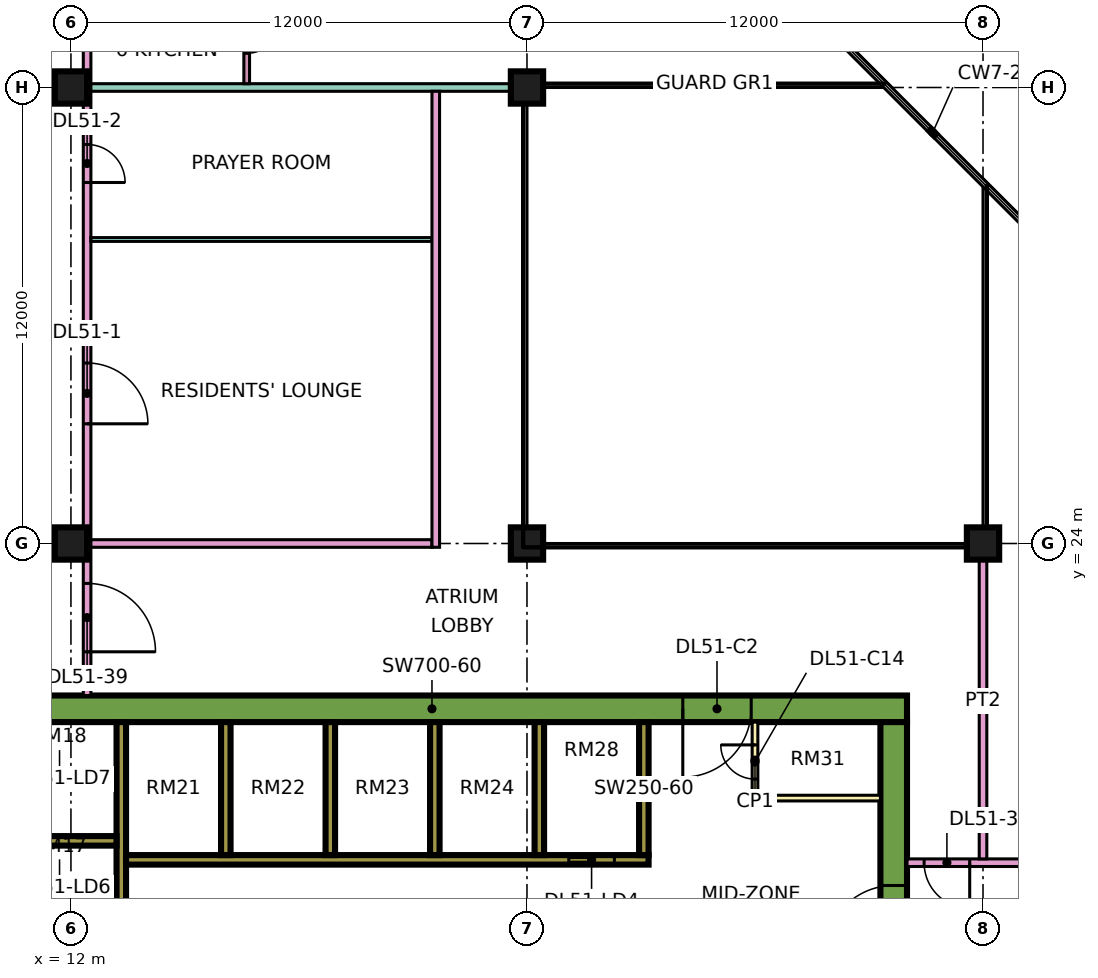
"""IFC4 building model, lengths in metres.
Left out: names, types, materials, properties, quantities, classifications, styles, units other than length and angle.
Written with IfcOpenShell. Run it as: python <this file> out.ifc"""

import sys

from ifc_helpers import new_model, si_unit, direction, frame, frame_2d, origin, origin_2d, place, context, subcontext, project, spatial, rectangle, extrude, element, fill, save


model = new_model("IFC4")
c1 = context("Model", 3, precision=1e-05, world=origin(), true_north=direction((0.0, 1.0)))
c2 = subcontext(c1, "Body", "Model", "MODEL_VIEW")
j1 = project(units=[si_unit("LENGTHUNIT", "METRE"), si_unit("PLANEANGLEUNIT", "RADIAN")], contexts=[c1])
p1 = place(None, origin())
s1 = spatial("IfcSite", under=j1, at=p1, CompositionType="ELEMENT")
p2 = place(p1, origin())
s2 = spatial("IfcBuilding", under=s1, at=p2, CompositionType="ELEMENT")
p3 = place(p2, frame((0.0, 0.0, 219.15)))
s3 = spatial("IfcBuildingStorey", under=s2, at=p3, CompositionType="ELEMENT", Elevation=219.15)
for number, where, z_axis, x_axis in (
    (1, (12.0, 24.0, 0.0), (0.0, 0.0, 1.0), (1.0, 0.0, 0.0)),
    (2, (12.0, 36.0, 0.0), (0.0, 0.0, 1.0), (1.0, 0.0, 0.0)),
    (3, (24.0, 24.0, 0.0), (0.0, 0.0, 1.0), (1.0, 0.0, 0.0)),
    (4, (24.0, 36.0, 0.0), (0.0, 0.0, 1.0), (1.0, 0.0, 0.0)),
    (5, (36.0, 24.0, 0.0), (0.0, 0.0, 1.0), (1.0, 0.0, 0.0)),
):
    element("IfcColumn", number, at=place(p3, frame(where, z_axis=z_axis, x_axis=x_axis)), inside=s3, PredefinedType="COLUMN", context=c2, shape_type="SweptSolid", body=[
        extrude(rectangle(XDim=0.85, YDim=0.85, at=origin_2d()), origin(), (0.0, 0.0, 1.0), 3.75),
    ])
p4 = place(p3, frame((9.0, 19.65, 0.0), z_axis=(0.0, 0.0, 1.0), x_axis=(1.0, 0.0, 0.0)))
e6 = element("IfcWall", 6, at=p4, inside=s3, PredefinedType="SHEAR", context=c2, shape_type="SweptSolid", body=[
    extrude(rectangle(XDim=25.0, YDim=0.7, at=frame_2d((12.5, 0.0))), origin(), (0.0, 0.0, 1.0), 3.75),
])
p5 = place(p4, frame((19.1, 0.0, 0.0)))
e7 = element("IfcOpeningElement", 7, at=p5, cuts=e6, PredefinedType="OPENING", context=c2, shape_type="SweptSolid", body=[
    extrude(rectangle(XDim=1.8, YDim=2.4, at=frame_2d((0.9, 1.2))), frame((0.0, 0.36, 0.0), z_axis=(0.0, -1.0, 0.0), x_axis=(1.0, 0.0, 0.0)), (0.0, 0.0, 1.0), 0.72),
])
p6 = place(p3, frame((33.65, 7.7, 0.0), z_axis=(0.0, 0.0, 1.0), x_axis=(0.0, 1.0, 0.0)))
e8 = element("IfcWall", 8, at=p6, inside=s3, PredefinedType="SHEAR", context=c2, shape_type="SweptSolid", body=[
    extrude(rectangle(XDim=11.6, YDim=0.7, at=frame_2d((5.8, 0.0))), origin(), (0.0, 0.0, 1.0), 3.75),
])
p7 = place(p6, frame((5.5, 0.0, 0.0)))
e9 = element("IfcOpeningElement", 9, at=p7, cuts=e8, PredefinedType="OPENING", context=c2, shape_type="SweptSolid", body=[
    extrude(rectangle(XDim=1.8, YDim=2.4, at=frame_2d((0.9, 1.2))), frame((0.0, 0.36, 0.0), z_axis=(0.0, -1.0, 0.0), x_axis=(1.0, 0.0, 0.0)), (0.0, 0.0, 1.0), 0.72),
])
p8 = place(p3, frame((13.325, 7.7, 0.0), z_axis=(0.0, 0.0, 1.0), x_axis=(0.0, 1.0, 0.0)))
e10 = element("IfcWall", 10, at=p8, inside=s3, PredefinedType="SHEAR", context=c2, shape_type="SweptSolid", body=[
    extrude(rectangle(XDim=11.6, YDim=0.25, at=frame_2d((5.8, 0.0))), origin(), (0.0, 0.0, 1.0), 3.75),
])
p9 = place(p3, frame((13.45, 15.675, 0.0), z_axis=(0.0, 0.0, 1.0), x_axis=(1.0, 0.0, 0.0)))
e11 = element("IfcWall", 11, at=p9, inside=s3, PredefinedType="SHEAR", context=c2, shape_type="SweptSolid", body=[
    extrude(rectangle(XDim=13.75, YDim=0.25, at=frame_2d((6.875, 0.0))), origin(), (0.0, 0.0, 1.0), 3.75),
])
p10 = place(p9, frame((11.65, 0.0, 0.0)))
e12 = element("IfcOpeningElement", 12, at=p10, cuts=e11, PredefinedType="OPENING", context=c2, shape_type="SweptSolid", body=[
    extrude(rectangle(XDim=1.2, YDim=2.2, at=frame_2d((0.6, 1.1))), frame((0.0, 0.135, 0.0), z_axis=(0.0, -1.0, 0.0), x_axis=(1.0, 0.0, 0.0)), (0.0, 0.0, 1.0), 0.27),
])
p11 = place(p3, frame((10.2, 16.175, 0.0), z_axis=(0.0, 0.0, 1.0), x_axis=(1.0, 0.0, 0.0)))
e13 = element("IfcWall", 13, at=p11, inside=s3, PredefinedType="SHEAR", context=c2, shape_type="SweptSolid", body=[
    extrude(rectangle(XDim=3.0, YDim=0.25, at=frame_2d((1.5, 0.0))), origin(), (0.0, 0.0, 1.0), 3.75),
])
for number, where, z_axis, x_axis in (
    (14, (16.075, 15.8, 0.0), (0.0, 0.0, 1.0), (0.0, 1.0, 0.0)),
    (15, (18.825, 15.8, 0.0), (0.0, 0.0, 1.0), (0.0, 1.0, 0.0)),
    (16, (21.575, 15.8, 0.0), (0.0, 0.0, 1.0), (0.0, 1.0, 0.0)),
    (17, (24.325, 15.8, 0.0), (0.0, 0.0, 1.0), (0.0, 1.0, 0.0)),
    (18, (27.075, 15.8, 0.0), (0.0, 0.0, 1.0), (0.0, 1.0, 0.0)),
):
    element("IfcWall", number, at=place(p3, frame(where, z_axis=z_axis, x_axis=x_axis)), inside=s3, PredefinedType="SHEAR", context=c2, shape_type="SweptSolid", body=[
        extrude(rectangle(XDim=3.5, YDim=0.25, at=frame_2d((1.75, 0.0))), origin(), (0.0, 0.0, 1.0), 3.75),
    ])
p12 = place(p3, frame((30.0, 17.3, 0.0), z_axis=(0.0, 0.0, 1.0), x_axis=(0.0, 1.0, 0.0)))
e19 = element("IfcWall", 19, at=p12, inside=s3, PredefinedType="PARTITIONING", context=c2, shape_type="SweptSolid", body=[
    extrude(rectangle(XDim=2.0, YDim=0.15, at=frame_2d((1.0, 0.0))), origin(), (0.0, 0.0, 1.0), 3.35),
])
p13 = place(p12, frame((0.5, 0.0, 0.0)))
e20 = element("IfcOpeningElement", 20, at=p13, cuts=e19, PredefinedType="OPENING", context=c2, shape_type="SweptSolid", body=[
    extrude(rectangle(XDim=0.9, YDim=2.1, at=frame_2d((0.45, 1.05))), frame((0.0, 0.085, 0.0), z_axis=(0.0, -1.0, 0.0), x_axis=(1.0, 0.0, 0.0)), (0.0, 0.0, 1.0), 0.17),
])
p14 = place(p3, frame((30.0, 17.3, 0.0), z_axis=(0.0, 0.0, 1.0), x_axis=(1.0, 0.0, 0.0)))
e21 = element("IfcWall", 21, at=p14, inside=s3, PredefinedType="PARTITIONING", context=c2, shape_type="SweptSolid", body=[
    extrude(rectangle(XDim=3.3, YDim=0.15, at=frame_2d((1.65, 0.0))), origin(), (0.0, 0.0, 1.0), 3.35),
])
p15 = place(p3, frame((12.425, 20.0, 0.0), z_axis=(0.0, 0.0, 1.0), x_axis=(0.0, 1.0, 0.0)))
e22 = element("IfcWall", 22, at=p15, inside=s3, PredefinedType="PARTITIONING", context=c2, shape_type="SweptSolid", body=[
    extrude(rectangle(XDim=43.0, YDim=0.2, at=frame_2d((21.5, 0.0))), origin(), (0.0, 0.0, 1.0), 3.35),
])
p16 = place(p15, frame((7.15, 0.0, 0.0)))
e23 = element("IfcOpeningElement", 23, at=p16, cuts=e22, PredefinedType="OPENING", context=c2, shape_type="SweptSolid", body=[
    extrude(rectangle(XDim=1.6, YDim=2.1, at=frame_2d((0.8, 1.05))), frame((0.0, 0.11, 0.0), z_axis=(0.0, -1.0, 0.0), x_axis=(1.0, 0.0, 0.0)), (0.0, 0.0, 1.0), 0.22),
])
p17 = place(p15, frame((13.5, 0.0, 0.0)))
e24 = element("IfcOpeningElement", 24, at=p17, cuts=e22, PredefinedType="OPENING", context=c2, shape_type="SweptSolid", body=[
    extrude(rectangle(XDim=1.0, YDim=2.1, at=frame_2d((0.5, 1.05))), frame((0.0, 0.11, 0.0), z_axis=(0.0, -1.0, 0.0), x_axis=(1.0, 0.0, 0.0)), (0.0, 0.0, 1.0), 0.22),
])
p18 = place(p15, frame((22.9, 0.0, 0.0)))
e25 = element("IfcOpeningElement", 25, at=p18, cuts=e22, PredefinedType="OPENING", context=c2, shape_type="SweptSolid", body=[
    extrude(rectangle(XDim=1.0, YDim=2.1, at=frame_2d((0.5, 1.05))), frame((0.0, 0.11, 0.0), z_axis=(0.0, -1.0, 0.0), x_axis=(1.0, 0.0, 0.0)), (0.0, 0.0, 1.0), 0.22),
])
p19 = place(p15, frame((35.35, 0.0, 0.0)))
e26 = element("IfcOpeningElement", 26, at=p19, cuts=e22, PredefinedType="OPENING", context=c2, shape_type="SweptSolid", body=[
    extrude(rectangle(XDim=1.0, YDim=2.1, at=frame_2d((0.5, 1.05))), frame((0.0, 0.11, 0.0), z_axis=(0.0, -1.0, 0.0), x_axis=(1.0, 0.0, 0.0)), (0.0, 0.0, 1.0), 0.22),
])
p20 = place(p15, frame((1.15, 0.0, 0.0)))
e27 = element("IfcOpeningElement", 27, at=p20, cuts=e22, PredefinedType="OPENING", context=c2, shape_type="SweptSolid", body=[
    extrude(rectangle(XDim=1.8, YDim=2.1, at=frame_2d((0.9, 1.05))), frame((0.0, 0.11, 0.0), z_axis=(0.0, -1.0, 0.0), x_axis=(1.0, 0.0, 0.0)), (0.0, 0.0, 1.0), 0.22),
])
p21 = place(p15, frame((28.6, 0.0, 0.0)))
e28 = element("IfcOpeningElement", 28, at=p21, cuts=e22, PredefinedType="OPENING", context=c2, shape_type="SweptSolid", body=[
    extrude(rectangle(XDim=1.8, YDim=2.1, at=frame_2d((0.9, 1.05))), frame((0.0, 0.11, 0.0), z_axis=(0.0, -1.0, 0.0), x_axis=(1.0, 0.0, 0.0)), (0.0, 0.0, 1.0), 0.22),
])
p22 = place(p3, frame((12.525, 24.0, 0.0), z_axis=(0.0, 0.0, 1.0), x_axis=(1.0, 0.0, 0.0)))
e29 = element("IfcWall", 29, at=p22, inside=s3, PredefinedType="PARTITIONING", context=c2, shape_type="SweptSolid", body=[
    extrude(rectangle(XDim=8.975, YDim=0.2, at=frame_2d((4.488, 0.0))), origin(), (0.0, 0.0, 1.0), 3.35),
])
p23 = place(p3, frame((12.525, 32.0, 0.0), z_axis=(0.0, 0.0, 1.0), x_axis=(1.0, 0.0, 0.0)))
e30 = element("IfcWall", 30, at=p23, inside=s3, PredefinedType="PARTITIONING", context=c2, shape_type="SweptSolid", body=[
    extrude(rectangle(XDim=8.975, YDim=0.1, at=frame_2d((4.488, 0.0))), origin(), (0.0, 0.0, 1.0), 3.35),
])
p24 = place(p3, frame((12.525, 36.0, 0.0), z_axis=(0.0, 0.0, 1.0), x_axis=(1.0, 0.0, 0.0)))
e31 = element("IfcWall", 31, at=p24, inside=s3, PredefinedType="PARTITIONING", context=c2, shape_type="SweptSolid", body=[
    extrude(rectangle(XDim=11.475, YDim=0.2, at=frame_2d((5.738, 0.0))), origin(), (0.0, 0.0, 1.0), 3.35),
])
p25 = place(p3, frame((16.625, 36.1, 0.0), z_axis=(0.0, 0.0, 1.0), x_axis=(0.0, 1.0, 0.0)))
e32 = element("IfcWall", 32, at=p25, inside=s3, PredefinedType="PARTITIONING", context=c2, shape_type="SweptSolid", body=[
    extrude(rectangle(XDim=5.675, YDim=0.15, at=frame_2d((2.837, 0.0))), origin(), (0.0, 0.0, 1.0), 3.35),
])
p26 = place(p25, frame((0.8, 0.0, 0.0)))
e33 = element("IfcOpeningElement", 33, at=p26, cuts=e32, PredefinedType="OPENING", context=c2, shape_type="SweptSolid", body=[
    extrude(rectangle(XDim=0.9, YDim=2.1, at=frame_2d((0.45, 1.05))), frame((0.0, 0.085, 0.0), z_axis=(0.0, -1.0, 0.0), x_axis=(1.0, 0.0, 0.0)), (0.0, 0.0, 1.0), 0.17),
])
p27 = place(p3, frame((21.6, 23.9, 0.0), z_axis=(0.0, 0.0, 1.0), x_axis=(0.0, 1.0, 0.0)))
e34 = element("IfcWall", 34, at=p27, inside=s3, PredefinedType="PARTITIONING", context=c2, shape_type="SweptSolid", body=[
    extrude(rectangle(XDim=12.0, YDim=0.2, at=frame_2d((6.0, 0.0))), origin(), (0.0, 0.0, 1.0), 3.35),
])
p28 = place(p3, frame((34.0, 15.6, 0.0), z_axis=(0.0, 0.0, 1.0), x_axis=(1.0, 0.0, 0.0)))
e35 = element("IfcWall", 35, at=p28, inside=s3, PredefinedType="PARTITIONING", context=c2, shape_type="SweptSolid", body=[
    extrude(rectangle(XDim=10.35, YDim=0.2, at=frame_2d((5.175, 0.0))), origin(), (0.0, 0.0, 1.0), 3.35),
])
p29 = place(p28, frame((5.6, 0.0, 0.0)))
e36 = element("IfcOpeningElement", 36, at=p29, cuts=e35, PredefinedType="OPENING", context=c2, shape_type="SweptSolid", body=[
    extrude(rectangle(XDim=1.0, YDim=2.1, at=frame_2d((0.5, 1.05))), frame((0.0, 0.11, 0.0), z_axis=(0.0, -1.0, 0.0), x_axis=(1.0, 0.0, 0.0)), (0.0, 0.0, 1.0), 0.22),
])
p30 = place(p28, frame((0.45, 0.0, 0.0)))
e37 = element("IfcOpeningElement", 37, at=p30, cuts=e35, PredefinedType="OPENING", context=c2, shape_type="SweptSolid", body=[
    extrude(rectangle(XDim=1.2, YDim=2.1, at=frame_2d((0.6, 1.05))), frame((0.0, 0.11, 0.0), z_axis=(0.0, -1.0, 0.0), x_axis=(1.0, 0.0, 0.0)), (0.0, 0.0, 1.0), 0.22),
])
p31 = place(p3, frame((36.0, 15.7, 0.0), z_axis=(0.0, 0.0, 1.0), x_axis=(0.0, 1.0, 0.0)))
e38 = element("IfcWall", 38, at=p31, inside=s3, PredefinedType="PARTITIONING", context=c2, shape_type="SweptSolid", body=[
    extrude(rectangle(XDim=8.3, YDim=0.2, at=frame_2d((4.15, 0.0))), origin(), (0.0, 0.0, 1.0), 3.35),
])
p32 = place(p10, origin())
e39 = element("IfcDoor", 39, at=p32, inside=s3, OperationType="DOUBLE_DOOR_SLIDING", PredefinedType="DOOR", context=c2, shape_type="SweptSolid", body=[
    extrude(rectangle(XDim=1.2, YDim=2.2, at=frame_2d((0.6, 1.1))), frame((0.0, 0.025, 0.0), z_axis=(0.0, -1.0, 0.0), x_axis=(1.0, 0.0, 0.0)), (0.0, 0.0, 1.0), 0.05),
])
fill(e12, e39)
p33 = place(p7, origin())
e40 = element("IfcDoor", 40, at=p33, inside=s3, OperationType="DOUBLE_DOOR_SINGLE_SWING", PredefinedType="DOOR", context=c2, shape_type="SweptSolid", body=[
    extrude(rectangle(XDim=1.8, YDim=2.4, at=frame_2d((0.9, 1.2))), frame((0.0, 0.025, 0.0), z_axis=(0.0, -1.0, 0.0), x_axis=(1.0, 0.0, 0.0)), (0.0, 0.0, 1.0), 0.05),
])
fill(e9, e40)
p34 = place(p5, frame((1.8, 0.0, 0.0), z_axis=(0.0, 0.0, 1.0), x_axis=(-1.0, 0.0, 0.0)))
e41 = element("IfcDoor", 41, at=p34, inside=s3, OperationType="DOUBLE_DOOR_SINGLE_SWING", PredefinedType="DOOR", context=c2, shape_type="SweptSolid", body=[
    extrude(rectangle(XDim=1.8, YDim=2.4, at=frame_2d((0.9, 1.2))), frame((0.0, 0.025, 0.0), z_axis=(0.0, -1.0, 0.0), x_axis=(1.0, 0.0, 0.0)), (0.0, 0.0, 1.0), 0.05),
])
fill(e7, e41)
p35 = place(p13, frame((0.9, 0.0, 0.0), z_axis=(0.0, 0.0, 1.0), x_axis=(-1.0, 0.0, 0.0)))
e42 = element("IfcDoor", 42, at=p35, inside=s3, OperationType="SINGLE_SWING_RIGHT", PredefinedType="DOOR", context=c2, shape_type="SweptSolid", body=[
    extrude(rectangle(XDim=0.9, YDim=2.1, at=frame_2d((0.45, 1.05))), frame((0.0, 0.025, 0.0), z_axis=(0.0, -1.0, 0.0), x_axis=(1.0, 0.0, 0.0)), (0.0, 0.0, 1.0), 0.05),
])
fill(e20, e42)
p36 = place(p16, frame((1.6, 0.0, 0.0), z_axis=(0.0, 0.0, 1.0), x_axis=(-1.0, 0.0, 0.0)))
e43 = element("IfcDoor", 43, at=p36, inside=s3, OperationType="DOUBLE_DOOR_SINGLE_SWING", PredefinedType="DOOR", context=c2, shape_type="SweptSolid", body=[
    extrude(rectangle(XDim=1.6, YDim=2.1, at=frame_2d((0.8, 1.05))), frame((0.0, 0.025, 0.0), z_axis=(0.0, -1.0, 0.0), x_axis=(1.0, 0.0, 0.0)), (0.0, 0.0, 1.0), 0.05),
])
fill(e23, e43)
p37 = place(p17, frame((1.0, 0.0, 0.0), z_axis=(0.0, 0.0, 1.0), x_axis=(-1.0, 0.0, 0.0)))
e44 = element("IfcDoor", 44, at=p37, inside=s3, OperationType="SINGLE_SWING_LEFT", PredefinedType="DOOR", context=c2, shape_type="SweptSolid", body=[
    extrude(rectangle(XDim=1.0, YDim=2.1, at=frame_2d((0.5, 1.05))), frame((0.0, 0.025, 0.0), z_axis=(0.0, -1.0, 0.0), x_axis=(1.0, 0.0, 0.0)), (0.0, 0.0, 1.0), 0.05),
])
fill(e24, e44)
p38 = place(p26, origin())
e45 = element("IfcDoor", 45, at=p38, inside=s3, OperationType="SINGLE_SWING_RIGHT", PredefinedType="DOOR", context=c2, shape_type="SweptSolid", body=[
    extrude(rectangle(XDim=0.9, YDim=2.1, at=frame_2d((0.45, 1.05))), frame((0.0, 0.025, 0.0), z_axis=(0.0, -1.0, 0.0), x_axis=(1.0, 0.0, 0.0)), (0.0, 0.0, 1.0), 0.05),
])
fill(e33, e45)
p39 = place(p30, origin())
e46 = element("IfcDoor", 46, at=p39, inside=s3, OperationType="SINGLE_SWING_RIGHT", PredefinedType="DOOR", context=c2, shape_type="SweptSolid", body=[
    extrude(rectangle(XDim=1.2, YDim=2.1, at=frame_2d((0.6, 1.05))), frame((0.0, 0.025, 0.0), z_axis=(0.0, -1.0, 0.0), x_axis=(1.0, 0.0, 0.0)), (0.0, 0.0, 1.0), 0.05),
])
fill(e37, e46)
p40 = place(p20, frame((1.8, 0.0, 0.0), z_axis=(0.0, 0.0, 1.0), x_axis=(-1.0, 0.0, 0.0)))
e47 = element("IfcDoor", 47, at=p40, inside=s3, OperationType="DOUBLE_DOOR_SINGLE_SWING", PredefinedType="DOOR", context=c2, shape_type="SweptSolid", body=[
    extrude(rectangle(XDim=1.8, YDim=2.1, at=frame_2d((0.9, 1.05))), frame((0.0, 0.025, 0.0), z_axis=(0.0, -1.0, 0.0), x_axis=(1.0, 0.0, 0.0)), (0.0, 0.0, 1.0), 0.05),
])
fill(e27, e47)
save(model, sys.argv[1])
